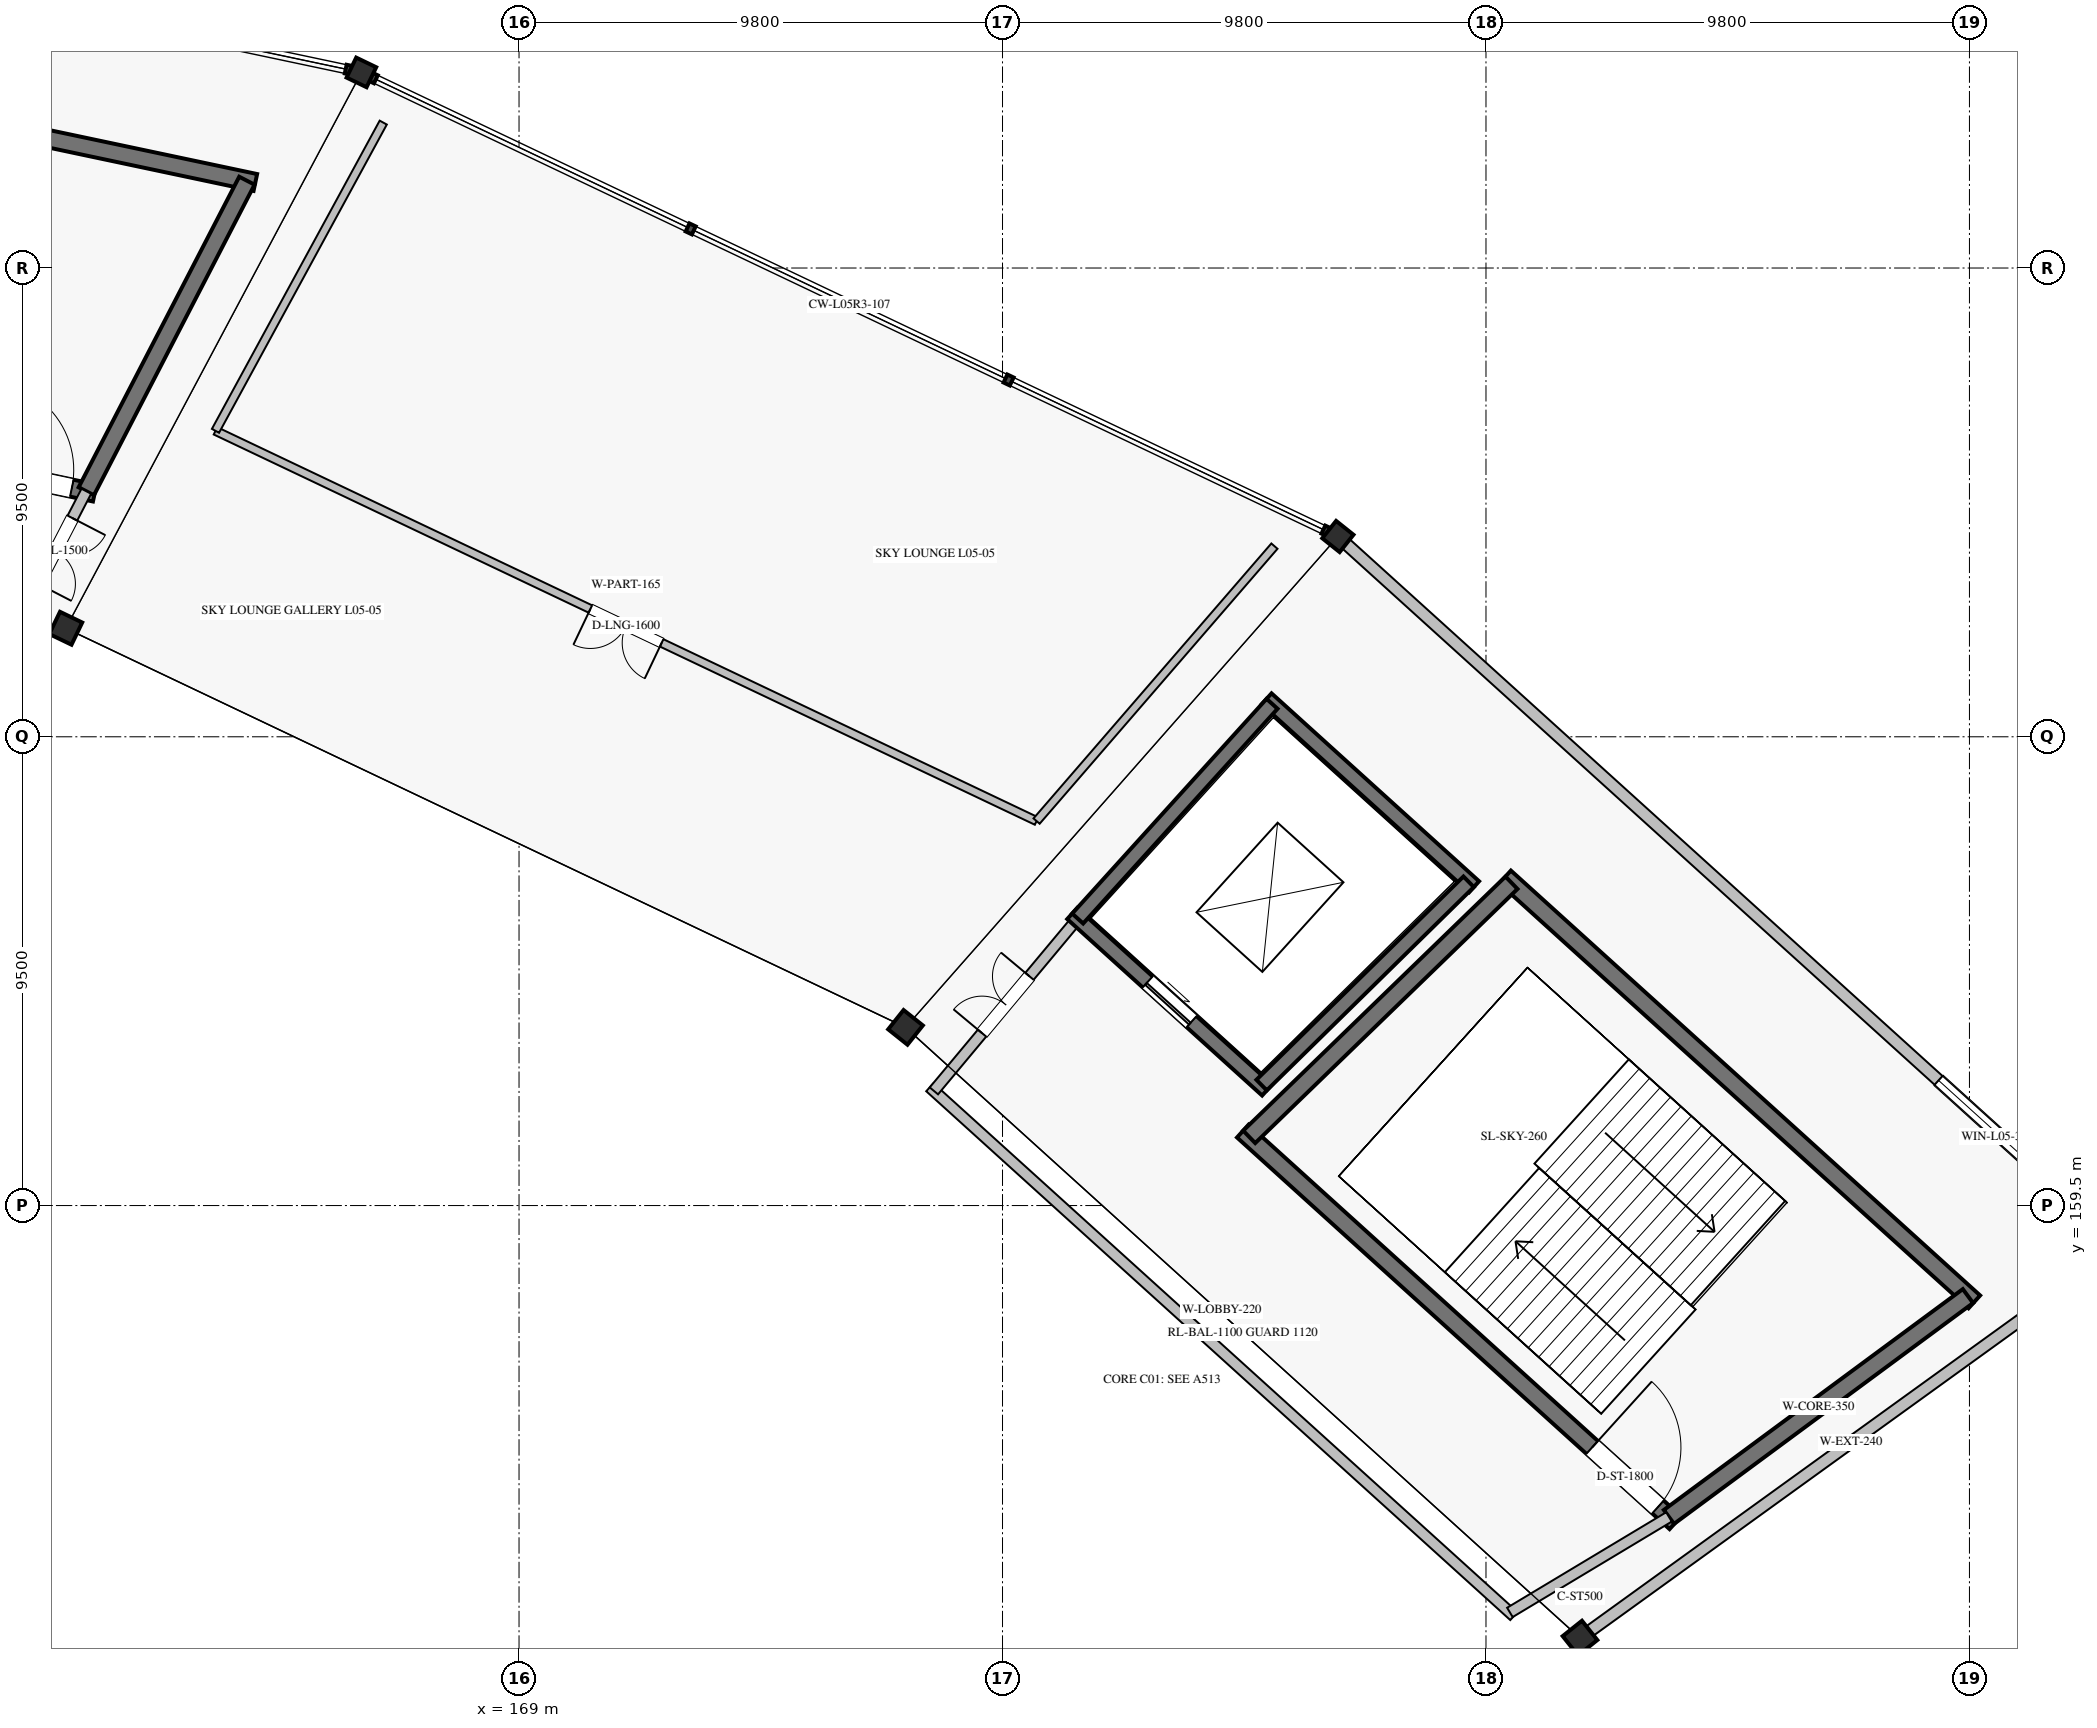
"""IFC4 building model, lengths in metres.
Left out: names, types, materials, properties, quantities, classifications, styles, units other than length and angle.
Written with IfcOpenShell. Run it as: python <this file> out.ifc"""

import sys

from ifc_helpers import new_model, si_unit, direction, frame, frame_2d, origin, origin_2d, place, context, subcontext, project, spatial, rectangle, hollow_rectangle, extrude, element, fill, save


model = new_model("IFC4")
c1 = context("Model", 3, precision=1e-05, world=origin(), true_north=direction((0.0, 1.0)))
c2 = subcontext(c1, "Body", "Model", "MODEL_VIEW")
j1 = project(units=[si_unit("LENGTHUNIT", "METRE"), si_unit("PLANEANGLEUNIT", "RADIAN")], contexts=[c1])
p1 = place(None, origin())
s1 = spatial("IfcSite", under=j1, at=p1, CompositionType="ELEMENT")
p2 = place(p1, origin())
s2 = spatial("IfcBuilding", under=s1, at=p2, CompositionType="ELEMENT")
p3 = place(p2, frame((0.0, 0.0, 25.84)))
s3 = spatial("IfcBuildingStorey", under=s2, at=p3, CompositionType="ELEMENT", Elevation=25.84)
for number, where, z_axis, x_axis in (
    (1, (190.506, 150.734, 0.0), (0.0, 0.0, 1.0), (0.782, 0.623, 0.0)),
    (2, (176.834, 163.111, 0.0), (0.0, 0.0, 1.0), (0.623, 0.782, 0.0)),
    (3, (159.812, 171.199, 0.0), (0.0, 0.0, 1.0), (0.434, 0.901, 0.0)),
):
    element("IfcColumn", number, at=place(p3, frame(where, z_axis=z_axis, x_axis=x_axis)), inside=s3, PredefinedType="COLUMN", context=c2, shape_type="SweptSolid", body=[
        extrude(hollow_rectangle(XDim=0.5, YDim=0.5, WallThickness=0.022, at=origin_2d()), origin(), (0.0, 0.0, 1.0), 5.44),
    ])
for number, where, z_axis, x_axis in (
    (4, (185.598, 173.059, 0.0), (0.0, 0.0, 1.0), (0.623, 0.782, 0.0)),
    (5, (165.805, 182.464, 0.0), (0.0, 0.0, 1.0), (0.434, 0.901, 0.0)),
):
    element("IfcColumn", number, at=place(p3, frame(where, z_axis=z_axis, x_axis=x_axis)), inside=s3, PredefinedType="COLUMN", context=c2, shape_type="SweptSolid", body=[
        extrude(hollow_rectangle(XDim=0.45, YDim=0.45, WallThickness=0.022, at=origin_2d()), origin(), (0.0, 0.0, 1.0), 5.44),
    ])
p4 = place(p3, frame((201.332, 158.815, 0.0), z_axis=(0.0, 0.0, 1.0), x_axis=(-0.741349049196, 0.671119651967, 0.0)))
e6 = element("IfcWall", 6, at=p4, inside=s3, PredefinedType="SOLIDWALL", context=c2, shape_type="SweptSolid", body=[
    extrude(rectangle(XDim=21.004, YDim=0.24, at=frame_2d((10.502, 0.0))), origin(), (0.0, 0.0, 1.0), 4.53),
])
p5 = place(p4, frame((1.4, 0.0, 1.0)))
e7 = element("IfcOpeningElement", 7, at=p5, cuts=e6, PredefinedType="OPENING", context=c2, shape_type="SweptSolid", body=[
    extrude(rectangle(XDim=3.4, YDim=2.3, at=frame_2d((1.7, 1.15))), frame((0.0, 0.13, 0.0), z_axis=(0.0, -1.0, 0.0), x_axis=(1.0, 0.0, 0.0)), (0.0, 0.0, 1.0), 0.26),
])
p6 = place(p3, frame((190.684, 150.863, 0.0), z_axis=(0.0, 0.0, 1.0), x_axis=(0.810798505274, 0.585325365797, 0.0)))
e8 = element("IfcWall", 8, at=p6, inside=s3, PredefinedType="SOLIDWALL", context=c2, shape_type="SweptSolid", body=[
    extrude(rectangle(XDim=13.114, YDim=0.24, at=frame_2d((6.557, 0.0))), origin(), (0.0, 0.0, 1.0), 4.478),
])
p7 = place(p3, frame((192.439, 153.072, 0.0), z_axis=(0.0, 0.0, 1.0), x_axis=(-0.741358227035, 0.671109513572, 0.0)))
e9 = element("IfcWall", 9, at=p7, inside=s3, PredefinedType="SHEAR", context=c2, shape_type="SweptSolid", body=[
    extrude(rectangle(XDim=11.827, YDim=0.35, at=frame_2d((5.913, 0.0))), origin(), (0.0, 0.0, 1.0), 5.18),
])
p8 = place(p7, frame((0.475, 0.0, 0.0)))
e10 = element("IfcOpeningElement", 10, at=p8, cuts=e9, PredefinedType="OPENING", context=c2, shape_type="SweptSolid", body=[
    extrude(rectangle(XDim=1.8, YDim=2.2, at=frame_2d((0.9, 1.1))), frame((0.0, 0.185, 0.0), z_axis=(0.0, -1.0, 0.0), x_axis=(1.0, 0.0, 0.0)), (0.0, 0.0, 1.0), 0.37),
])
p9 = place(p3, frame((198.499, 157.548, 0.0), z_axis=(0.0, 0.0, 1.0), x_axis=(-0.741351373721, 0.671117084183, 0.0)))
e11 = element("IfcWall", 11, at=p9, inside=s3, PredefinedType="SHEAR", context=c2, shape_type="SweptSolid", body=[
    extrude(rectangle(XDim=12.83, YDim=0.35, at=frame_2d((6.415, 0.0))), origin(), (0.0, 0.0, 1.0), 5.18),
])
p10 = place(p3, frame((192.309, 153.189, 0.0), z_axis=(0.0, 0.0, 1.0), x_axis=(0.804395625347, 0.594093997548, 0.0)))
e12 = element("IfcWall", 12, at=p10, inside=s3, PredefinedType="SHEAR", context=c2, shape_type="SweptSolid", body=[
    extrude(rectangle(XDim=7.534, YDim=0.35, at=frame_2d((3.767, 0.0))), origin(), (0.0, 0.0, 1.0), 5.18),
])
p11 = place(p3, frame((183.801, 160.892, 0.0), z_axis=(0.0, 0.0, 1.0), x_axis=(0.718297398554, 0.69573619083, 0.0)))
e13 = element("IfcWall", 13, at=p11, inside=s3, PredefinedType="SHEAR", context=c2, shape_type="SweptSolid", body=[
    extrude(rectangle(XDim=7.402, YDim=0.35, at=frame_2d((3.701, 0.0))), origin(), (0.0, 0.0, 1.0), 5.18),
])
p12 = place(p3, frame((184.163, 161.841, 0.0), z_axis=(0.0, 0.0, 1.0), x_axis=(-0.741350155641, 0.671118429736, 0.0)))
e14 = element("IfcWall", 14, at=p12, inside=s3, PredefinedType="SHEAR", context=c2, shape_type="SweptSolid", body=[
    extrude(rectangle(XDim=5.329, YDim=0.3, at=frame_2d((2.665, 0.0))), origin(), (0.0, 0.0, 1.0), 5.18),
])
p13 = place(p12, frame((2.065, 0.0, 0.0)))
e15 = element("IfcOpeningElement", 15, at=p13, cuts=e14, PredefinedType="OPENING", context=c2, shape_type="SweptSolid", body=[
    extrude(rectangle(XDim=1.2, YDim=2.2, at=frame_2d((0.6, 1.1))), frame((0.0, 0.16, 0.0), z_axis=(0.0, -1.0, 0.0), x_axis=(1.0, 0.0, 0.0)), (0.0, 0.0, 1.0), 0.32),
])
p14 = place(p3, frame((188.36, 165.961, 0.0), z_axis=(0.0, 0.0, 1.0), x_axis=(-0.74134208775, 0.671127341815, 0.0)))
e16 = element("IfcWall", 16, at=p14, inside=s3, PredefinedType="SHEAR", context=c2, shape_type="SweptSolid", body=[
    extrude(rectangle(XDim=5.675, YDim=0.3, at=frame_2d((2.837, 0.0))), origin(), (0.0, 0.0, 1.0), 5.18),
])
p15 = place(p3, frame((184.052, 161.941, 0.0), z_axis=(0.0, 0.0, 1.0), x_axis=(0.713553028001, 0.700601224828, 0.0)))
e17 = element("IfcWall", 17, at=p15, inside=s3, PredefinedType="SHEAR", context=c2, shape_type="SweptSolid", body=[
    extrude(rectangle(XDim=5.881, YDim=0.3, at=frame_2d((2.94, 0.0))), origin(), (0.0, 0.0, 1.0), 5.18),
])
p16 = place(p3, frame((180.324, 165.316, 0.0), z_axis=(0.0, 0.0, 1.0), x_axis=(0.67115829282, 0.741314067031, 0.0)))
e18 = element("IfcWall", 18, at=p16, inside=s3, PredefinedType="SHEAR", context=c2, shape_type="SweptSolid", body=[
    extrude(rectangle(XDim=5.871, YDim=0.3, at=frame_2d((2.935, 0.0))), origin(), (0.0, 0.0, 1.0), 5.18),
])
p17 = place(p3, frame((189.166, 151.181, 0.0), z_axis=(0.0, 0.0, 1.0), x_axis=(-0.741351035574, 0.671117457717, 0.0)))
e19 = element("IfcWall", 19, at=p17, inside=s3, PredefinedType="SOLIDWALL", context=c2, shape_type="SweptSolid", body=[
    extrude(rectangle(XDim=15.969, YDim=0.22, at=frame_2d((7.985, 0.0))), origin(), (0.0, 0.0, 1.0), 5.18),
])
p18 = place(p3, frame((189.085, 151.254, 0.0), z_axis=(0.0, 0.0, 1.0), x_axis=(0.857424171966, 0.514610327654, 0.0)))
e20 = element("IfcWall", 20, at=p18, inside=s3, PredefinedType="SOLIDWALL", context=c2, shape_type="SweptSolid", body=[
    extrude(rectangle(XDim=3.76, YDim=0.22, at=frame_2d((1.88, 0.0))), origin(), (0.0, 0.0, 1.0), 5.18),
])
p19 = place(p3, frame((177.409, 161.824, 0.0), z_axis=(0.0, 0.0, 1.0), x_axis=(0.640759627034, 0.767741558315, 0.0)))
e21 = element("IfcWall", 21, at=p19, inside=s3, PredefinedType="SOLIDWALL", context=c2, shape_type="SweptSolid", body=[
    extrude(rectangle(XDim=4.549, YDim=0.22, at=frame_2d((2.274, 0.0))), origin(), (0.0, 0.0, 1.0), 5.18),
])
p20 = place(p19, frame((1.524, 0.0, 0.0)))
e22 = element("IfcOpeningElement", 22, at=p20, cuts=e21, PredefinedType="OPENING", context=c2, shape_type="SweptSolid", body=[
    extrude(rectangle(XDim=1.5, YDim=2.2, at=frame_2d((0.75, 1.1))), frame((0.0, 0.12, 0.0), z_axis=(0.0, -1.0, 0.0), x_axis=(1.0, 0.0, 0.0)), (0.0, 0.0, 1.0), 0.24),
])
p21 = place(p3, frame((160.4, 173.94, 0.0), z_axis=(0.0, 0.0, 1.0), x_axis=(-0.978345203961, 0.206979858648, 0.0)))
e23 = element("IfcWall", 23, at=p21, inside=s3, PredefinedType="SHEAR", context=c2, shape_type="SweptSolid", body=[
    extrude(rectangle(XDim=12.044, YDim=0.35, at=frame_2d((6.022, 0.0))), origin(), (0.0, 0.0, 1.0), 5.18),
])
p22 = place(p21, frame((0.475, 0.0, 0.0)))
e24 = element("IfcOpeningElement", 24, at=p22, cuts=e23, PredefinedType="OPENING", context=c2, shape_type="SweptSolid", body=[
    extrude(rectangle(XDim=1.8, YDim=2.2, at=frame_2d((0.9, 1.1))), frame((0.0, 0.185, 0.0), z_axis=(0.0, -1.0, 0.0), x_axis=(1.0, 0.0, 0.0)), (0.0, 0.0, 1.0), 0.37),
])
p23 = place(p3, frame((163.655, 180.233, 0.0), z_axis=(0.0, 0.0, 1.0), x_axis=(-0.978345119536, 0.206980257705, 0.0)))
e25 = element("IfcWall", 25, at=p23, inside=s3, PredefinedType="SHEAR", context=c2, shape_type="SweptSolid", body=[
    extrude(rectangle(XDim=13.067, YDim=0.35, at=frame_2d((6.533, 0.0))), origin(), (0.0, 0.0, 1.0), 5.18),
])
p24 = place(p3, frame((160.229, 173.976, 0.0), z_axis=(0.0, 0.0, 1.0), x_axis=(0.459409796564, 0.888224430435, 0.0)))
e26 = element("IfcWall", 26, at=p24, inside=s3, PredefinedType="SHEAR", context=c2, shape_type="SweptSolid", body=[
    extrude(rectangle(XDim=7.086, YDim=0.35, at=frame_2d((3.543, 0.0))), origin(), (0.0, 0.0, 1.0), 5.18),
])
p25 = place(p3, frame((158.976, 171.555, 0.0), z_axis=(0.0, 0.0, 1.0), x_axis=(0.459461910618, 0.888197473928, 0.0)))
e27 = element("IfcWall", 27, at=p25, inside=s3, PredefinedType="SOLIDWALL", context=c2, shape_type="SweptSolid", body=[
    extrude(rectangle(XDim=2.725, YDim=0.22, at=frame_2d((1.363, 0.0))), origin(), (0.0, 0.0, 1.0), 5.18),
])
p26 = place(p25, frame((0.613, 0.0, 0.0)))
e28 = element("IfcOpeningElement", 28, at=p26, cuts=e27, PredefinedType="OPENING", context=c2, shape_type="SweptSolid", body=[
    extrude(rectangle(XDim=1.5, YDim=2.2, at=frame_2d((0.75, 1.1))), frame((0.0, 0.12, 0.0), z_axis=(0.0, -1.0, 0.0), x_axis=(1.0, 0.0, 0.0)), (0.0, 0.0, 1.0), 0.24),
])
p27 = place(p3, frame((179.491, 167.292, 0.0), z_axis=(0.0, 0.0, 1.0), x_axis=(-0.90321677741, 0.429184637429, 0.0)))
e29 = element("IfcWall", 29, at=p27, inside=s3, PredefinedType="PARTITIONING", context=c2, shape_type="SweptSolid", body=[
    extrude(rectangle(XDim=18.427, YDim=0.165, at=frame_2d((9.214, 0.0))), origin(), (0.0, 0.0, 1.0), 4.5),
])
p28 = place(p27, frame((8.414, 0.0, 0.0)))
e30 = element("IfcOpeningElement", 30, at=p28, cuts=e29, PredefinedType="OPENING", context=c2, shape_type="SweptSolid", body=[
    extrude(rectangle(XDim=1.6, YDim=2.3, at=frame_2d((0.8, 1.15))), frame((0.0, 0.093, 0.0), z_axis=(0.0, -1.0, 0.0), x_axis=(1.0, 0.0, 0.0)), (0.0, 0.0, 1.0), 0.185),
])
p29 = place(p3, frame((179.491, 167.292, 0.0), z_axis=(0.0, 0.0, 1.0), x_axis=(0.654288201841, 0.7562452968, 0.0)))
e31 = element("IfcWall", 31, at=p29, inside=s3, PredefinedType="PARTITIONING", context=c2, shape_type="SweptSolid", body=[
    extrude(rectangle(XDim=7.368, YDim=0.165, at=frame_2d((3.684, 0.0))), origin(), (0.0, 0.0, 1.0), 4.5),
])
p30 = place(p3, frame((162.847, 175.2, 0.0), z_axis=(0.0, 0.0, 1.0), x_axis=(0.47812325427, 0.878292749444, 0.0)))
e32 = element("IfcWall", 32, at=p30, inside=s3, PredefinedType="PARTITIONING", context=c2, shape_type="SweptSolid", body=[
    extrude(rectangle(XDim=7.113, YDim=0.165, at=frame_2d((3.556, 0.0))), origin(), (0.0, 0.0, 1.0), 4.5),
])
p31 = place(p5, origin())
e33 = element("IfcWindow", 33, at=p31, inside=s3, PartitioningType="SINGLE_PANEL", PredefinedType="WINDOW", context=c2, shape_type="SweptSolid", body=[
    extrude(rectangle(XDim=3.4, YDim=2.3, at=frame_2d((1.7, 1.15))), frame((0.0, 0.03, 0.0), z_axis=(0.0, -1.0, 0.0), x_axis=(1.0, 0.0, 0.0)), (0.0, 0.0, 1.0), 0.06),
])
fill(e7, e33)
p32 = place(p8, frame((1.8, 0.0, 0.0), z_axis=(0.0, 0.0, 1.0), x_axis=(-1.0, 0.0, 0.0)))
e34 = element("IfcDoor", 34, at=p32, inside=s3, OperationType="SINGLE_SWING_LEFT", PredefinedType="DOOR", context=c2, shape_type="SweptSolid", body=[
    extrude(rectangle(XDim=1.8, YDim=2.2, at=frame_2d((0.9, 1.1))), frame((0.0, 0.025, 0.0), z_axis=(0.0, -1.0, 0.0), x_axis=(1.0, 0.0, 0.0)), (0.0, 0.0, 1.0), 0.05),
])
fill(e10, e34)
p33 = place(p13, origin())
e35 = element("IfcDoor", 35, at=p33, inside=s3, OperationType="SLIDING_TO_LEFT", PredefinedType="DOOR", context=c2, shape_type="SweptSolid", body=[
    extrude(rectangle(XDim=1.2, YDim=2.2, at=frame_2d((0.6, 1.1))), frame((0.0, 0.025, 0.0), z_axis=(0.0, -1.0, 0.0), x_axis=(1.0, 0.0, 0.0)), (0.0, 0.0, 1.0), 0.05),
])
fill(e15, e35)
p34 = place(p20, origin())
e36 = element("IfcDoor", 36, at=p34, inside=s3, OperationType="DOUBLE_DOOR_SINGLE_SWING", PredefinedType="DOOR", context=c2, shape_type="SweptSolid", body=[
    extrude(rectangle(XDim=1.5, YDim=2.2, at=frame_2d((0.75, 1.1))), frame((0.0, 0.025, 0.0), z_axis=(0.0, -1.0, 0.0), x_axis=(1.0, 0.0, 0.0)), (0.0, 0.0, 1.0), 0.05),
])
fill(e22, e36)
p35 = place(p22, frame((1.8, 0.0, 0.0), z_axis=(0.0, 0.0, 1.0), x_axis=(-1.0, 0.0, 0.0)))
e37 = element("IfcDoor", 37, at=p35, inside=s3, OperationType="SINGLE_SWING_LEFT", PredefinedType="DOOR", context=c2, shape_type="SweptSolid", body=[
    extrude(rectangle(XDim=1.8, YDim=2.2, at=frame_2d((0.9, 1.1))), frame((0.0, 0.025, 0.0), z_axis=(0.0, -1.0, 0.0), x_axis=(1.0, 0.0, 0.0)), (0.0, 0.0, 1.0), 0.05),
])
fill(e24, e37)
p36 = place(p26, frame((1.5, 0.0, 0.0), z_axis=(0.0, 0.0, 1.0), x_axis=(-1.0, 0.0, 0.0)))
e38 = element("IfcDoor", 38, at=p36, inside=s3, OperationType="DOUBLE_DOOR_SINGLE_SWING", PredefinedType="DOOR", context=c2, shape_type="SweptSolid", body=[
    extrude(rectangle(XDim=1.5, YDim=2.2, at=frame_2d((0.75, 1.1))), frame((0.0, 0.025, 0.0), z_axis=(0.0, -1.0, 0.0), x_axis=(1.0, 0.0, 0.0)), (0.0, 0.0, 1.0), 0.05),
])
fill(e28, e38)
p37 = place(p28, origin())
e39 = element("IfcDoor", 39, at=p37, inside=s3, OperationType="DOUBLE_DOOR_SINGLE_SWING", PredefinedType="DOOR", context=c2, shape_type="SweptSolid", body=[
    extrude(rectangle(XDim=1.6, YDim=2.3, at=frame_2d((0.8, 1.15))), frame((0.0, 0.025, 0.0), z_axis=(0.0, -1.0, 0.0), x_axis=(1.0, 0.0, 0.0)), (0.0, 0.0, 1.0), 0.05),
])
fill(e30, e39)
save(model, sys.argv[1])
